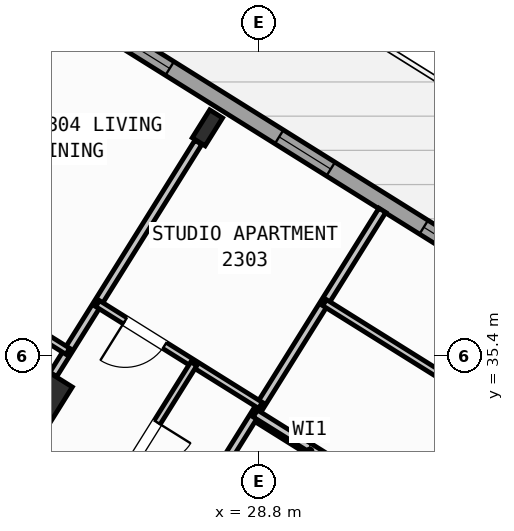
"""IFC4 building model, lengths in metres.
Left out: names, types, materials, properties, quantities, classifications, styles, units other than length and angle.
Written with IfcOpenShell. Run it as: python <this file> out.ifc"""

import sys

from ifc_helpers import new_model, si_unit, direction, frame, frame_2d, origin, origin_2d, place, context, subcontext, project, spatial, rectangle, hollow_rectangle, i_section, extrude, source, transform, mapped, element, fill, save


model = new_model("IFC4")
c1 = context("Model", 3, precision=1e-05, world=origin(), true_north=direction((0.0, 1.0)))
c2 = subcontext(c1, "Body", "Model", "MODEL_VIEW")
j1 = project(units=[si_unit("LENGTHUNIT", "METRE"), si_unit("PLANEANGLEUNIT", "RADIAN")], contexts=[c1])
p1 = place(None, origin())
s1 = spatial("IfcSite", under=j1, at=p1, CompositionType="ELEMENT")
p2 = place(p1, origin())
s2 = spatial("IfcBuilding", under=s1, at=p2, CompositionType="ELEMENT")
p3 = place(p2, frame((0.0, 0.0, 93.6)))
s3 = spatial("IfcBuildingStorey", under=s2, at=p3, CompositionType="ELEMENT", Elevation=93.6)
m1 = source(origin(), c2, "Body", "SweptSolid", [
    extrude(i_section(OverallWidth=0.3, OverallDepth=0.65, WebThickness=0.016, FlangeThickness=0.031, at=origin_2d()), origin(), (0.0, 0.0, 1.0), 3.6),
])
p4 = place(p3, frame((27.786, 39.901, 0.0), z_axis=(0.0, 0.0, 1.0), x_axis=(-0.848048096156, 0.529919264233, 0.0)))
e1 = element("IfcColumn", 1, at=p4, inside=s3, PredefinedType="COLUMN", context=c2, shape_type="MappedRepresentation", body=[
    mapped(m1, transform((0.0, 0.0, 0.0), scale=1.0)),
])
m2 = source(origin(), c2, "Body", "SweptSolid", [
    extrude(hollow_rectangle(XDim=0.9, YDim=0.9, WallThickness=0.036, at=origin_2d()), origin(), (0.0, 0.0, 1.0), 3.6),
])
p5 = place(p3, frame((24.5, 34.643, 0.0), z_axis=(0.0, 0.0, 1.0), x_axis=(-0.848048096156, 0.529919264233, 0.0)))
e2 = element("IfcColumn", 2, at=p5, inside=s3, PredefinedType="COLUMN", context=c2, shape_type="MappedRepresentation", body=[
    mapped(m2, transform((0.0, 0.0, 0.0), scale=1.0)),
])
p6 = place(p3, frame((17.424, 47.083, 0.0), z_axis=(0.0, 0.0, 1.0), x_axis=(0.848049927979, -0.529916332693, 0.0)))
e3 = element("IfcWall", 3, at=p6, inside=s3, PredefinedType="STANDARD", context=c2, shape_type="SweptSolid", body=[
    extrude(rectangle(XDim=29.223, YDim=0.32, at=frame_2d((14.612, 0.0))), origin(), (0.0, 0.0, 1.0), 3.35),
])
p7 = place(p6, frame((3.745, 0.0, 0.0)))
e4 = element("IfcOpeningElement", 4, at=p7, cuts=e3, PredefinedType="OPENING", context=c2, shape_type="SweptSolid", body=[
    extrude(rectangle(XDim=1.05, YDim=2.15, at=frame_2d((0.525, 1.075))), frame((0.0, 0.17, 0.0), z_axis=(0.0, -1.0, 0.0), x_axis=(1.0, 0.0, 0.0)), (0.0, 0.0, 1.0), 0.34),
])
p8 = place(p6, frame((0.699, 0.0, 0.95)))
e5 = element("IfcOpeningElement", 5, at=p8, cuts=e3, PredefinedType="OPENING", context=c2, shape_type="SweptSolid", body=[
    extrude(rectangle(XDim=1.2, YDim=1.4, at=frame_2d((0.6, 0.7))), frame((0.0, 0.17, 0.0), z_axis=(0.0, -1.0, 0.0), x_axis=(1.0, 0.0, 0.0)), (0.0, 0.0, 1.0), 0.34),
])
p9 = place(p6, frame((6.951, 0.0, 1.0)))
e6 = element("IfcOpeningElement", 6, at=p9, cuts=e3, PredefinedType="OPENING", context=c2, shape_type="SweptSolid", body=[
    extrude(rectangle(XDim=0.9, YDim=1.25, at=frame_2d((0.45, 0.625))), frame((0.0, 0.17, 0.0), z_axis=(0.0, -1.0, 0.0), x_axis=(1.0, 0.0, 0.0)), (0.0, 0.0, 1.0), 0.34),
])
p10 = place(p6, frame((9.841, 0.0, 0.85)))
e7 = element("IfcOpeningElement", 7, at=p10, cuts=e3, PredefinedType="OPENING", context=c2, shape_type="SweptSolid", body=[
    extrude(rectangle(XDim=1.5, YDim=1.5, at=frame_2d((0.75, 0.75))), frame((0.0, 0.17, 0.0), z_axis=(0.0, -1.0, 0.0), x_axis=(1.0, 0.0, 0.0)), (0.0, 0.0, 1.0), 0.34),
])
p11 = place(p6, frame((13.889, 0.0, 0.95)))
e8 = element("IfcOpeningElement", 8, at=p11, cuts=e3, PredefinedType="OPENING", context=c2, shape_type="SweptSolid", body=[
    extrude(rectangle(XDim=1.2, YDim=1.4, at=frame_2d((0.6, 0.7))), frame((0.0, 0.17, 0.0), z_axis=(0.0, -1.0, 0.0), x_axis=(1.0, 0.0, 0.0)), (0.0, 0.0, 1.0), 0.34),
])
p12 = place(p6, frame((17.254, 0.0, 1.0)))
e9 = element("IfcOpeningElement", 9, at=p12, cuts=e3, PredefinedType="OPENING", context=c2, shape_type="SweptSolid", body=[
    extrude(rectangle(XDim=0.9, YDim=1.25, at=frame_2d((0.45, 0.625))), frame((0.0, 0.17, 0.0), z_axis=(0.0, -1.0, 0.0), x_axis=(1.0, 0.0, 0.0)), (0.0, 0.0, 1.0), 0.34),
])
p13 = place(p6, frame((20.764, 0.0, 0.8)))
e10 = element("IfcOpeningElement", 10, at=p13, cuts=e3, PredefinedType="OPENING", context=c2, shape_type="SweptSolid", body=[
    extrude(rectangle(XDim=2.1, YDim=1.55, at=frame_2d((1.05, 0.775))), frame((0.0, 0.17, 0.0), z_axis=(0.0, -1.0, 0.0), x_axis=(1.0, 0.0, 0.0)), (0.0, 0.0, 1.0), 0.34),
])
p14 = place(p6, frame((25.403, 0.0, 0.8)))
e11 = element("IfcOpeningElement", 11, at=p14, cuts=e3, PredefinedType="OPENING", context=c2, shape_type="SweptSolid", body=[
    extrude(rectangle(XDim=2.1, YDim=1.55, at=frame_2d((1.05, 0.775))), frame((0.0, 0.17, 0.0), z_axis=(0.0, -1.0, 0.0), x_axis=(1.0, 0.0, 0.0)), (0.0, 0.0, 1.0), 0.34),
])
p15 = place(p3, frame((30.914, 32.829, 0.0), z_axis=(0.0, 0.0, 1.0), x_axis=(-0.848008813643, 0.529982124211, 0.0)))
e12 = element("IfcWall", 12, at=p15, inside=s3, PredefinedType="PARTITIONING", context=c2, shape_type="SweptSolid", body=[
    extrude(rectangle(XDim=2.61, YDim=0.16, at=frame_2d((1.305, 0.0))), origin(), (0.0, 0.0, 1.0), 3.34),
])
p16 = place(p3, frame((31.239, 38.274, 0.0), z_axis=(0.0, 0.0, 1.0), x_axis=(-0.529928058306, -0.848042600947, 0.0)))
e13 = element("IfcWall", 13, at=p16, inside=s3, PredefinedType="PARTITIONING", context=c2, shape_type="SweptSolid", body=[
    extrude(rectangle(XDim=8.05, YDim=0.16, at=frame_2d((4.025, 0.0))), origin(), (0.0, 0.0, 1.0), 3.34),
])
p17 = place(p3, frame((26.973, 31.447, 0.0), z_axis=(0.0, 0.0, 1.0), x_axis=(-0.848048310262, 0.529918921593, 0.0)))
e14 = element("IfcWall", 14, at=p17, inside=s3, PredefinedType="PARTITIONING", context=c2, shape_type="SweptSolid", body=[
    extrude(rectangle(XDim=16.73, YDim=0.16, at=frame_2d((8.365, 0.0))), origin(), (0.0, 0.0, 1.0), 3.34),
])
p18 = place(p17, frame((2.22, 0.0, 0.0)))
e15 = element("IfcOpeningElement", 15, at=p18, cuts=e14, PredefinedType="OPENING", context=c2, shape_type="SweptSolid", body=[
    extrude(rectangle(XDim=0.86, YDim=2.05, at=frame_2d((0.43, 1.025))), frame((0.0, 0.09, 0.0), z_axis=(0.0, -1.0, 0.0), x_axis=(1.0, 0.0, 0.0)), (0.0, 0.0, 1.0), 0.18),
])
p19 = place(p17, frame((5.28, 0.0, 0.0)))
e16 = element("IfcOpeningElement", 16, at=p19, cuts=e14, PredefinedType="OPENING", context=c2, shape_type="SweptSolid", body=[
    extrude(rectangle(XDim=1.0, YDim=2.1, at=frame_2d((0.5, 1.05))), frame((0.0, 0.09, 0.0), z_axis=(0.0, -1.0, 0.0), x_axis=(1.0, 0.0, 0.0)), (0.0, 0.0, 1.0), 0.18),
])
p20 = place(p3, frame((25.807, 29.582, 0.0), z_axis=(0.0, 0.0, 1.0), x_axis=(-0.848052408131, 0.529912363569, 0.0)))
e17 = element("IfcWall", 17, at=p20, inside=s3, PredefinedType="PARTITIONING", context=c2, shape_type="SweptSolid", body=[
    extrude(rectangle(XDim=16.73, YDim=0.16, at=frame_2d((8.365, 0.0))), origin(), (0.0, 0.0, 1.0), 3.34),
])
p21 = place(p20, frame((2.22, 0.0, 0.0)))
e18 = element("IfcOpeningElement", 18, at=p21, cuts=e17, PredefinedType="OPENING", context=c2, shape_type="SweptSolid", body=[
    extrude(rectangle(XDim=0.86, YDim=2.05, at=frame_2d((0.43, 1.025))), frame((0.0, 0.09, 0.0), z_axis=(0.0, -1.0, 0.0), x_axis=(1.0, 0.0, 0.0)), (0.0, 0.0, 1.0), 0.18),
])
p22 = place(p20, frame((14.013, 0.0, 0.0)))
e19 = element("IfcOpeningElement", 19, at=p22, cuts=e17, PredefinedType="OPENING", context=c2, shape_type="SweptSolid", body=[
    extrude(rectangle(XDim=1.0, YDim=2.1, at=frame_2d((0.5, 1.05))), frame((0.0, 0.09, 0.0), z_axis=(0.0, -1.0, 0.0), x_axis=(1.0, 0.0, 0.0)), (0.0, 0.0, 1.0), 0.18),
])
p23 = place(p3, frame((27.607, 39.615, 0.0), z_axis=(0.0, 0.0, 1.0), x_axis=(-0.529913610495, -0.848051628978, 0.0)))
e20 = element("IfcWall", 20, at=p23, inside=s3, PredefinedType="PARTITIONING", context=c2, shape_type="SweptSolid", body=[
    extrude(rectangle(XDim=5.401, YDim=0.16, at=frame_2d((2.7, 0.0))), origin(), (0.0, 0.0, 1.0), 2.775),
])
p24 = place(p3, frame((28.833, 34.424, 0.0), z_axis=(0.0, 0.0, 1.0), x_axis=(-0.848059820872, 0.529900500304, 0.0)))
e21 = element("IfcWall", 21, at=p24, inside=s3, PredefinedType="PLUMBINGWALL", context=c2, shape_type="SweptSolid", body=[
    extrude(rectangle(XDim=3.79, YDim=0.14, at=frame_2d((1.895, 0.0))), origin(), (0.0, 0.0, 1.0), 3.34),
])
p25 = place(p24, frame((2.23, 0.0, 0.0)))
e22 = element("IfcOpeningElement", 22, at=p25, cuts=e21, PredefinedType="OPENING", context=c2, shape_type="SweptSolid", body=[
    extrude(rectangle(XDim=0.92, YDim=2.08, at=frame_2d((0.46, 1.04))), frame((0.0, 0.08, 0.0), z_axis=(0.0, -1.0, 0.0), x_axis=(1.0, 0.0, 0.0)), (0.0, 0.0, 1.0), 0.16),
])
p26 = place(p3, frame((27.518, 35.245, 0.0), z_axis=(0.0, 0.0, 1.0), x_axis=(-0.529948921118, -0.848029563757, 0.0)))
e23 = element("IfcWall", 23, at=p26, inside=s3, PredefinedType="PLUMBINGWALL", context=c2, shape_type="SweptSolid", body=[
    extrude(rectangle(XDim=3.51, YDim=0.14, at=frame_2d((1.755, 0.0))), origin(), (0.0, 0.0, 1.0), 2.995),
])
p27 = place(p26, frame((1.365, 0.0, 0.0)))
e24 = element("IfcOpeningElement", 24, at=p27, cuts=e23, PredefinedType="OPENING", context=c2, shape_type="SweptSolid", body=[
    extrude(rectangle(XDim=0.78, YDim=2.05, at=frame_2d((0.39, 1.025))), frame((0.0, 0.08, 0.0), z_axis=(0.0, -1.0, 0.0), x_axis=(1.0, 0.0, 0.0)), (0.0, 0.0, 1.0), 0.16),
])
p28 = place(p3, frame((24.792, 42.62, 0.0), z_axis=(0.0, 0.0, 1.0), x_axis=(-0.529925083182, -0.848044460046, 0.0)))
e25 = element("IfcWall", 25, at=p28, inside=s3, PredefinedType="PARTITIONING", context=c2, shape_type="SweptSolid", body=[
    extrude(rectangle(XDim=8.32, YDim=0.11, at=frame_2d((4.16, 0.0))), origin(), (0.0, 0.0, 1.0), 3.34),
])
p29 = place(p28, frame((4.65, 0.0, 0.0)))
e26 = element("IfcOpeningElement", 26, at=p29, cuts=e25, PredefinedType="OPENING", context=c2, shape_type="SweptSolid", body=[
    extrude(rectangle(XDim=0.78, YDim=2.05, at=frame_2d((0.39, 1.025))), frame((0.0, 0.065, 0.0), z_axis=(0.0, -1.0, 0.0), x_axis=(1.0, 0.0, 0.0)), (0.0, 0.0, 1.0), 0.13),
])
p30 = place(p3, frame((25.03, 35.491, 0.0), z_axis=(0.0, 0.0, 1.0), x_axis=(-0.848070667369, 0.52988314103, 0.0)))
e27 = element("IfcWall", 27, at=p30, inside=s3, PredefinedType="PLUMBINGWALL", context=c2, shape_type="SweptSolid", body=[
    extrude(rectangle(XDim=3.98, YDim=0.14, at=frame_2d((1.99, 0.0))), origin(), (0.0, 0.0, 1.0), 3.34),
])
p31 = place(p30, frame((1.93, 0.0, 0.0)))
e28 = element("IfcOpeningElement", 28, at=p31, cuts=e27, PredefinedType="OPENING", context=c2, shape_type="SweptSolid", body=[
    extrude(rectangle(XDim=0.92, YDim=2.08, at=frame_2d((0.46, 1.04))), frame((0.0, 0.08, 0.0), z_axis=(0.0, -1.0, 0.0), x_axis=(1.0, 0.0, 0.0)), (0.0, 0.0, 1.0), 0.16),
])
p32 = place(p3, frame((41.936, 26.012, 0.0), z_axis=(0.0, 0.0, 1.0), x_axis=(-0.848051154596, 0.529914369676, 0.0)))
e29 = element("IfcWall", 29, at=p32, inside=s3, PredefinedType="PARTITIONING", context=c2, shape_type="SweptSolid", body=[
    extrude(rectangle(XDim=15.57, YDim=0.16, at=frame_2d((7.785, 0.0))), origin(), (0.0, 0.0, 1.0), 3.34),
])
p33 = place(p32, frame((10.83, 0.0, 0.0)))
e30 = element("IfcOpeningElement", 30, at=p33, cuts=e29, PredefinedType="OPENING", context=c2, shape_type="SweptSolid", body=[
    extrude(rectangle(XDim=1.0, YDim=2.1, at=frame_2d((0.5, 1.05))), frame((0.0, 0.09, 0.0), z_axis=(0.0, -1.0, 0.0), x_axis=(1.0, 0.0, 0.0)), (0.0, 0.0, 1.0), 0.18),
])
p34 = place(p3, frame((42.226, 28.873, 0.0), z_axis=(0.0, 0.0, 1.0), x_axis=(-0.848049134363, 0.529917602752, 0.0)))
e31 = element("IfcWall", 31, at=p34, inside=s3, PredefinedType="PLUMBINGWALL", context=c2, shape_type="SweptSolid", body=[
    extrude(rectangle(XDim=14.3, YDim=0.14, at=frame_2d((7.15, 0.0))), origin(), (0.0, 0.0, 1.0), 3.34),
])
p35 = place(p34, frame((9.57, 0.0, 0.0)))
e32 = element("IfcOpeningElement", 32, at=p35, cuts=e31, PredefinedType="OPENING", context=c2, shape_type="SweptSolid", body=[
    extrude(rectangle(XDim=0.92, YDim=2.08, at=frame_2d((0.46, 1.04))), frame((0.0, 0.08, 0.0), z_axis=(0.0, -1.0, 0.0), x_axis=(1.0, 0.0, 0.0)), (0.0, 0.0, 1.0), 0.16),
])
m3 = source(origin(), c2, "Body", "SweptSolid", [
    extrude(rectangle(XDim=1.5, YDim=1.5, at=frame_2d((0.75, 0.75))), frame((0.0, 0.03, 0.0), z_axis=(0.0, -1.0, 0.0), x_axis=(1.0, 0.0, 0.0)), (0.0, 0.0, 1.0), 0.06),
])
p36 = place(p10, origin())
e33 = element("IfcWindow", 33, at=p36, inside=s3, PartitioningType="SINGLE_PANEL", PredefinedType="WINDOW", context=c2, shape_type="MappedRepresentation", body=[
    mapped(m3, transform((0.0, 0.0, 0.0), scale=1.0)),
])
fill(e7, e33)
m4 = source(origin(), c2, "Body", "SweptSolid", [
    extrude(rectangle(XDim=1.2, YDim=1.4, at=frame_2d((0.6, 0.7))), frame((0.0, 0.03, 0.0), z_axis=(0.0, -1.0, 0.0), x_axis=(1.0, 0.0, 0.0)), (0.0, 0.0, 1.0), 0.06),
])
p37 = place(p11, origin())
e34 = element("IfcWindow", 34, at=p37, inside=s3, PartitioningType="SINGLE_PANEL", PredefinedType="WINDOW", context=c2, shape_type="MappedRepresentation", body=[
    mapped(m4, transform((0.0, 0.0, 0.0), scale=1.0)),
])
fill(e8, e34)
m5 = source(origin(), c2, "Body", "SweptSolid", [
    extrude(rectangle(XDim=0.9, YDim=1.25, at=frame_2d((0.45, 0.625))), frame((0.0, 0.03, 0.0), z_axis=(0.0, -1.0, 0.0), x_axis=(1.0, 0.0, 0.0)), (0.0, 0.0, 1.0), 0.06),
])
p38 = place(p12, origin())
e35 = element("IfcWindow", 35, at=p38, inside=s3, PartitioningType="SINGLE_PANEL", PredefinedType="WINDOW", context=c2, shape_type="MappedRepresentation", body=[
    mapped(m5, transform((0.0, 0.0, 0.0), scale=1.0)),
])
fill(e9, e35)
m6 = source(origin(), c2, "Body", "SweptSolid", [
    extrude(rectangle(XDim=0.92, YDim=2.08, at=frame_2d((0.46, 1.04))), frame((0.0, 0.025, 0.0), z_axis=(0.0, -1.0, 0.0), x_axis=(1.0, 0.0, 0.0)), (0.0, 0.0, 1.0), 0.05),
])
p39 = place(p25, origin())
e36 = element("IfcDoor", 36, at=p39, inside=s3, OperationType="SINGLE_SWING_RIGHT", PredefinedType="DOOR", context=c2, shape_type="MappedRepresentation", body=[
    mapped(m6, transform((0.0, 0.0, 0.0), scale=1.0)),
])
fill(e22, e36)
m7 = source(origin(), c2, "Body", "SweptSolid", [
    extrude(rectangle(XDim=0.78, YDim=2.05, at=frame_2d((0.39, 1.025))), frame((0.0, 0.025, 0.0), z_axis=(0.0, -1.0, 0.0), x_axis=(1.0, 0.0, 0.0)), (0.0, 0.0, 1.0), 0.05),
])
p40 = place(p27, origin())
e37 = element("IfcDoor", 37, at=p40, inside=s3, OperationType="SINGLE_SWING_LEFT", PredefinedType="DOOR", context=c2, shape_type="MappedRepresentation", body=[
    mapped(m7, transform((0.0, 0.0, 0.0), scale=1.0)),
])
fill(e24, e37)
save(model, sys.argv[1])
